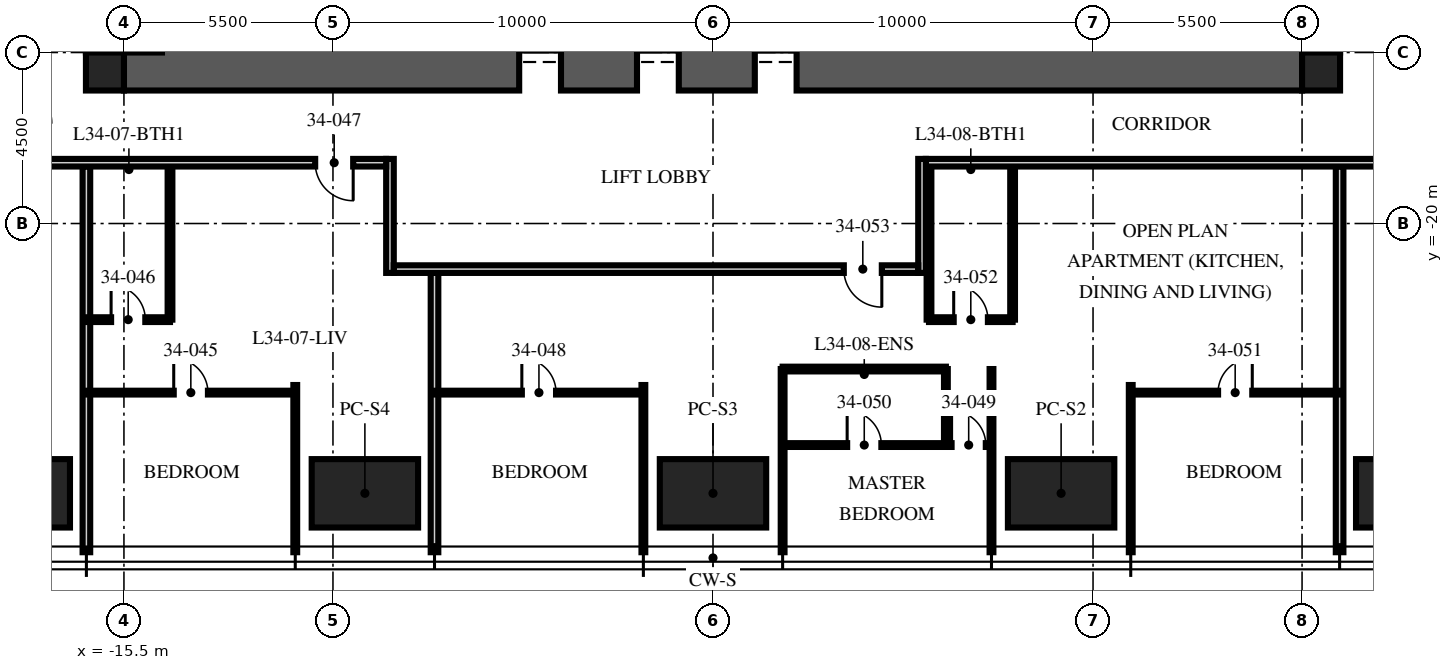
"""IFC4 building model, lengths in metres.
Left out: names, types, materials, properties, quantities, classifications, styles, units other than length and angle.
Written with IfcOpenShell. Run it as: python <this file> out.ifc"""

import sys

from ifc_helpers import new_model, si_unit, direction, frame, frame_2d, origin, origin_2d, place, context, subcontext, project, spatial, rectangle, extrude, element, fill, save


model = new_model("IFC4")
c1 = context("Model", 3, precision=1e-05, world=origin(), true_north=direction((0.0, 1.0)))
c2 = subcontext(c1, "Body", "Model", "MODEL_VIEW")
j1 = project(units=[si_unit("LENGTHUNIT", "METRE"), si_unit("PLANEANGLEUNIT", "RADIAN")], contexts=[c1])
p1 = place(None, origin())
s1 = spatial("IfcSite", under=j1, at=p1, CompositionType="ELEMENT")
p2 = place(p1, origin())
s2 = spatial("IfcBuilding", under=s1, at=p2, CompositionType="ELEMENT")
p3 = place(p2, frame((0.0, 0.0, 137.25)))
s3 = spatial("IfcBuildingStorey", under=s2, at=p3, CompositionType="ELEMENT", Elevation=137.25)
p4 = place(p3, frame((-15.5, -15.5, -0.25), z_axis=(0.0, 0.0, 1.0), x_axis=(1.0, 0.0, 0.0)))
e1 = element("IfcWall", 1, at=p4, inside=s3, PredefinedType="SHEAR", context=c2, shape_type="SweptSolid", body=[
    extrude(rectangle(XDim=31.0, YDim=2.0, at=frame_2d((15.5, 0.0))), origin(), (0.0, 0.0, 1.0), 3.75),
])
p5 = place(p4, frame((10.4, 0.0, 0.25)))
e2 = element("IfcOpeningElement", 2, at=p5, cuts=e1, PredefinedType="OPENING", context=c2, shape_type="SweptSolid", body=[
    extrude(rectangle(XDim=1.1, YDim=2.1, at=frame_2d((0.55, 1.05))), frame((0.0, 1.01, 0.0), z_axis=(0.0, -1.0, 0.0), x_axis=(1.0, 0.0, 0.0)), (0.0, 0.0, 1.0), 2.02),
])
p6 = place(p4, frame((13.5, 0.0, 0.25)))
e3 = element("IfcOpeningElement", 3, at=p6, cuts=e1, PredefinedType="OPENING", context=c2, shape_type="SweptSolid", body=[
    extrude(rectangle(XDim=1.1, YDim=2.1, at=frame_2d((0.55, 1.05))), frame((0.0, 1.01, 0.0), z_axis=(0.0, -1.0, 0.0), x_axis=(1.0, 0.0, 0.0)), (0.0, 0.0, 1.0), 2.02),
])
p7 = place(p4, frame((16.6, 0.0, 0.25)))
e4 = element("IfcOpeningElement", 4, at=p7, cuts=e1, PredefinedType="OPENING", context=c2, shape_type="SweptSolid", body=[
    extrude(rectangle(XDim=1.1, YDim=2.1, at=frame_2d((0.55, 1.05))), frame((0.0, 1.01, 0.0), z_axis=(0.0, -1.0, 0.0), x_axis=(1.0, 0.0, 0.0)), (0.0, 0.0, 1.0), 2.02),
])
for number, where, z_axis, x_axis in (
    (5, (-16.0, -16.0, -0.25), (0.0, 0.0, 1.0), (1.0, 0.0, 0.0)),
    (6, (16.0, -16.0, -0.25), (0.0, 0.0, 1.0), (1.0, 0.0, 0.0)),
):
    element("IfcColumn", number, at=place(p3, frame(where, z_axis=z_axis, x_axis=x_axis)), inside=s3, PredefinedType="COLUMN", context=c2, shape_type="SweptSolid", body=[
        extrude(rectangle(XDim=1.0, YDim=1.0, at=origin_2d()), origin(), (0.0, 0.0, 1.0), 3.75),
    ])
for number, where, z_axis, x_axis in (
    (7, (18.32, -27.1, 0.0), (0.0, 0.0, 1.0), (1.0, 0.0, 0.0)),
    (8, (9.16, -27.1, 0.0), (0.0, 0.0, 1.0), (1.0, 0.0, 0.0)),
    (9, (0.0, -27.1, 0.0), (0.0, 0.0, 1.0), (1.0, 0.0, 0.0)),
    (10, (-9.16, -27.1, 0.0), (0.0, 0.0, 1.0), (1.0, 0.0, 0.0)),
    (11, (-18.32, -27.1, 0.0), (0.0, 0.0, 1.0), (1.0, 0.0, 0.0)),
):
    element("IfcColumn", number, at=place(p3, frame(where, z_axis=z_axis, x_axis=x_axis)), inside=s3, PredefinedType="COLUMN", context=c2, shape_type="SweptSolid", body=[
        extrude(rectangle(XDim=2.8, YDim=1.8, at=origin_2d()), origin(), (0.0, 0.0, 1.0), 3.75),
    ])
p8 = place(p3, frame((-16.488, -18.5, 0.0), z_axis=(0.0, 0.0, 1.0), x_axis=(0.0, -1.0, 0.0)))
e12 = element("IfcWall", 12, at=p8, inside=s3, PredefinedType="PARTITIONING", context=c2, shape_type="SweptSolid", body=[
    extrude(rectangle(XDim=10.15, YDim=0.2, at=frame_2d((5.075, 0.0))), origin(), (0.0, 0.0, 1.0), 2.81),
])
p9 = place(p3, frame((-10.992, -24.25, 0.0), z_axis=(0.0, 0.0, 1.0), x_axis=(0.0, -1.0, 0.0)))
e13 = element("IfcWall", 13, at=p9, inside=s3, PredefinedType="PARTITIONING", context=c2, shape_type="SweptSolid", body=[
    extrude(rectangle(XDim=4.4, YDim=0.1, at=frame_2d((2.2, 0.0))), origin(), (0.0, 0.0, 1.0), 2.81),
])
p10 = place(p3, frame((-7.328, -21.3, 0.0), z_axis=(0.0, 0.0, 1.0), x_axis=(0.0, -1.0, 0.0)))
e14 = element("IfcWall", 14, at=p10, inside=s3, PredefinedType="PARTITIONING", context=c2, shape_type="SweptSolid", body=[
    extrude(rectangle(XDim=7.35, YDim=0.2, at=frame_2d((3.675, 0.0))), origin(), (0.0, 0.0, 1.0), 2.81),
])
p11 = place(p3, frame((-1.832, -24.25, 0.0), z_axis=(0.0, 0.0, 1.0), x_axis=(0.0, -1.0, 0.0)))
e15 = element("IfcWall", 15, at=p11, inside=s3, PredefinedType="PARTITIONING", context=c2, shape_type="SweptSolid", body=[
    extrude(rectangle(XDim=4.4, YDim=0.1, at=frame_2d((2.2, 0.0))), origin(), (0.0, 0.0, 1.0), 2.81),
])
for number, where, z_axis, x_axis in (
    (16, (1.832, -23.83, 0.0), (0.0, 0.0, 1.0), (0.0, -1.0, 0.0)),
    (17, (7.328, -23.83, 0.0), (0.0, 0.0, 1.0), (0.0, -1.0, 0.0)),
):
    element("IfcWall", number, at=place(p3, frame(where, z_axis=z_axis, x_axis=x_axis)), inside=s3, PredefinedType="PARTITIONING", context=c2, shape_type="SweptSolid", body=[
        extrude(rectangle(XDim=4.82, YDim=0.1, at=frame_2d((2.41, 0.0))), origin(), (0.0, 0.0, 1.0), 2.81),
    ])
p12 = place(p3, frame((10.992, -24.25, 0.0), z_axis=(0.0, 0.0, 1.0), x_axis=(0.0, -1.0, 0.0)))
e18 = element("IfcWall", 18, at=p12, inside=s3, PredefinedType="PARTITIONING", context=c2, shape_type="SweptSolid", body=[
    extrude(rectangle(XDim=4.4, YDim=0.1, at=frame_2d((2.2, 0.0))), origin(), (0.0, 0.0, 1.0), 2.81),
])
p13 = place(p3, frame((16.488, -18.5, 0.0), z_axis=(0.0, 0.0, 1.0), x_axis=(0.0, -1.0, 0.0)))
e19 = element("IfcWall", 19, at=p13, inside=s3, PredefinedType="PARTITIONING", context=c2, shape_type="SweptSolid", body=[
    extrude(rectangle(XDim=10.15, YDim=0.2, at=frame_2d((5.075, 0.0))), origin(), (0.0, 0.0, 1.0), 2.81),
])
p14 = place(p3, frame((-16.488, -24.45, 0.0), z_axis=(0.0, 0.0, 1.0), x_axis=(1.0, 0.0, 0.0)))
e20 = element("IfcWall", 20, at=p14, inside=s3, PredefinedType="PARTITIONING", context=c2, shape_type="SweptSolid", body=[
    extrude(rectangle(XDim=5.496, YDim=0.1, at=frame_2d((2.748, 0.0))), origin(), (0.0, 0.0, 1.0), 2.81),
])
p15 = place(p14, frame((2.298, 0.0, 0.0)))
e21 = element("IfcOpeningElement", 21, at=p15, cuts=e20, PredefinedType="OPENING", context=c2, shape_type="SweptSolid", body=[
    extrude(rectangle(XDim=0.9, YDim=2.1, at=frame_2d((0.45, 1.05))), frame((0.0, 0.06, 0.0), z_axis=(0.0, -1.0, 0.0), x_axis=(1.0, 0.0, 0.0)), (0.0, 0.0, 1.0), 0.12),
])
p16 = place(p3, frame((-16.488, -22.53, 0.0), z_axis=(0.0, 0.0, 1.0), x_axis=(1.0, 0.0, 0.0)))
e22 = element("IfcWall", 22, at=p16, inside=s3, PredefinedType="PARTITIONING", context=c2, shape_type="SweptSolid", body=[
    extrude(rectangle(XDim=2.2, YDim=0.125, at=frame_2d((1.1, 0.0))), origin(), (0.0, 0.0, 1.0), 3.5),
])
p17 = place(p16, frame((0.65, 0.0, 0.0)))
e23 = element("IfcOpeningElement", 23, at=p17, cuts=e22, PredefinedType="OPENING", context=c2, shape_type="SweptSolid", body=[
    extrude(rectangle(XDim=0.9, YDim=2.1, at=frame_2d((0.45, 1.05))), frame((0.0, 0.073, 0.0), z_axis=(0.0, -1.0, 0.0), x_axis=(1.0, 0.0, 0.0)), (0.0, 0.0, 1.0), 0.145),
])
p18 = place(p3, frame((-14.288, -18.5, 0.0), z_axis=(0.0, 0.0, 1.0), x_axis=(0.0, -1.0, 0.0)))
e24 = element("IfcWall", 24, at=p18, inside=s3, PredefinedType="PARTITIONING", context=c2, shape_type="SweptSolid", body=[
    extrude(rectangle(XDim=4.03, YDim=0.125, at=frame_2d((2.015, 0.0))), origin(), (0.0, 0.0, 1.0), 3.5),
])
p19 = place(p3, frame((-7.328, -24.45, 0.0), z_axis=(0.0, 0.0, 1.0), x_axis=(1.0, 0.0, 0.0)))
e25 = element("IfcWall", 25, at=p19, inside=s3, PredefinedType="PARTITIONING", context=c2, shape_type="SweptSolid", body=[
    extrude(rectangle(XDim=5.496, YDim=0.1, at=frame_2d((2.748, 0.0))), origin(), (0.0, 0.0, 1.0), 2.81),
])
p20 = place(p19, frame((2.298, 0.0, 0.0)))
e26 = element("IfcOpeningElement", 26, at=p20, cuts=e25, PredefinedType="OPENING", context=c2, shape_type="SweptSolid", body=[
    extrude(rectangle(XDim=0.9, YDim=2.1, at=frame_2d((0.45, 1.05))), frame((0.0, 0.06, 0.0), z_axis=(0.0, -1.0, 0.0), x_axis=(1.0, 0.0, 0.0)), (0.0, 0.0, 1.0), 0.12),
])
p21 = place(p3, frame((1.832, -25.83, 0.0), z_axis=(0.0, 0.0, 1.0), x_axis=(1.0, 0.0, 0.0)))
e27 = element("IfcWall", 27, at=p21, inside=s3, PredefinedType="PARTITIONING", context=c2, shape_type="SweptSolid", body=[
    extrude(rectangle(XDim=5.496, YDim=0.1, at=frame_2d((2.748, 0.0))), origin(), (0.0, 0.0, 1.0), 2.81),
])
p22 = place(p21, frame((4.446, 0.0, 0.0)))
e28 = element("IfcOpeningElement", 28, at=p22, cuts=e27, PredefinedType="OPENING", context=c2, shape_type="SweptSolid", body=[
    extrude(rectangle(XDim=0.9, YDim=2.1, at=frame_2d((0.45, 1.05))), frame((0.0, 0.06, 0.0), z_axis=(0.0, -1.0, 0.0), x_axis=(1.0, 0.0, 0.0)), (0.0, 0.0, 1.0), 0.12),
])
p23 = place(p21, frame((1.698, 0.0, 0.0)))
e29 = element("IfcOpeningElement", 29, at=p23, cuts=e27, PredefinedType="OPENING", context=c2, shape_type="SweptSolid", body=[
    extrude(rectangle(XDim=0.9, YDim=2.1, at=frame_2d((0.45, 1.05))), frame((0.0, 0.06, 0.0), z_axis=(0.0, -1.0, 0.0), x_axis=(1.0, 0.0, 0.0)), (0.0, 0.0, 1.0), 0.12),
])
p24 = place(p3, frame((6.128, -23.83, 0.0), z_axis=(0.0, 0.0, 1.0), x_axis=(0.0, -1.0, 0.0)))
e30 = element("IfcWall", 30, at=p24, inside=s3, PredefinedType="PARTITIONING", context=c2, shape_type="SweptSolid", body=[
    extrude(rectangle(XDim=2.0, YDim=0.1, at=frame_2d((1.0, 0.0))), origin(), (0.0, 0.0, 1.0), 3.5),
])
p25 = place(p3, frame((1.832, -23.83, 0.0), z_axis=(0.0, 0.0, 1.0), x_axis=(1.0, 0.0, 0.0)))
e31 = element("IfcWall", 31, at=p25, inside=s3, PredefinedType="PARTITIONING", context=c2, shape_type="SweptSolid", body=[
    extrude(rectangle(XDim=4.296, YDim=0.125, at=frame_2d((2.148, 0.0))), origin(), (0.0, 0.0, 1.0), 2.81),
])
p26 = place(p3, frame((10.992, -24.45, 0.0), z_axis=(0.0, 0.0, 1.0), x_axis=(1.0, 0.0, 0.0)))
e32 = element("IfcWall", 32, at=p26, inside=s3, PredefinedType="PARTITIONING", context=c2, shape_type="SweptSolid", body=[
    extrude(rectangle(XDim=5.496, YDim=0.1, at=frame_2d((2.748, 0.0))), origin(), (0.0, 0.0, 1.0), 2.81),
])
p27 = place(p26, frame((2.298, 0.0, 0.0)))
e33 = element("IfcOpeningElement", 33, at=p27, cuts=e32, PredefinedType="OPENING", context=c2, shape_type="SweptSolid", body=[
    extrude(rectangle(XDim=0.9, YDim=2.1, at=frame_2d((0.45, 1.05))), frame((0.0, 0.06, 0.0), z_axis=(0.0, -1.0, 0.0), x_axis=(1.0, 0.0, 0.0)), (0.0, 0.0, 1.0), 0.12),
])
p28 = place(p3, frame((5.684, -22.53, 0.0), z_axis=(0.0, 0.0, 1.0), x_axis=(1.0, 0.0, 0.0)))
e34 = element("IfcWall", 34, at=p28, inside=s3, PredefinedType="PARTITIONING", context=c2, shape_type="SweptSolid", body=[
    extrude(rectangle(XDim=2.2, YDim=0.125, at=frame_2d((1.1, 0.0))), origin(), (0.0, 0.0, 1.0), 3.5),
])
p29 = place(p28, frame((0.65, 0.0, 0.0)))
e35 = element("IfcOpeningElement", 35, at=p29, cuts=e34, PredefinedType="OPENING", context=c2, shape_type="SweptSolid", body=[
    extrude(rectangle(XDim=0.9, YDim=2.1, at=frame_2d((0.45, 1.05))), frame((0.0, 0.073, 0.0), z_axis=(0.0, -1.0, 0.0), x_axis=(1.0, 0.0, 0.0)), (0.0, 0.0, 1.0), 0.145),
])
for number, where, z_axis, x_axis in (
    (36, (5.684, -18.5, 0.0), (0.0, 0.0, 1.0), (0.0, -1.0, 0.0)),
    (37, (7.884, -18.5, 0.0), (0.0, 0.0, 1.0), (0.0, -1.0, 0.0)),
):
    element("IfcWall", number, at=place(p3, frame(where, z_axis=z_axis, x_axis=x_axis)), inside=s3, PredefinedType="PARTITIONING", context=c2, shape_type="SweptSolid", body=[
        extrude(rectangle(XDim=4.03, YDim=0.125, at=frame_2d((2.015, 0.0))), origin(), (0.0, 0.0, 1.0), 3.5),
    ])
p30 = place(p3, frame((18.5, -18.4, 0.0), z_axis=(0.0, 0.0, 1.0), x_axis=(-1.0, 0.0, 0.0)))
e38 = element("IfcWall", 38, at=p30, inside=s3, PredefinedType="PARTITIONING", context=c2, shape_type="SweptSolid", body=[
    extrude(rectangle(XDim=12.9, YDim=0.2, at=frame_2d((6.45, 0.0))), origin(), (0.0, 0.0, 1.0), 2.3),
])
for number, where, z_axis, x_axis in (
    (39, (5.5, -18.3, 0.0), (0.0, 0.0, 1.0), (0.0, -1.0, 0.0)),
    (40, (-8.5, -18.3, 0.0), (0.0, 0.0, 1.0), (0.0, -1.0, 0.0)),
):
    element("IfcWall", number, at=place(p3, frame(where, z_axis=z_axis, x_axis=x_axis)), inside=s3, PredefinedType="PARTITIONING", context=c2, shape_type="SweptSolid", body=[
        extrude(rectangle(XDim=3.0, YDim=0.2, at=frame_2d((1.5, 0.0))), origin(), (0.0, 0.0, 1.0), 3.5),
    ])
p31 = place(p3, frame((5.4, -21.2, 0.0), z_axis=(0.0, 0.0, 1.0), x_axis=(-1.0, 0.0, 0.0)))
e41 = element("IfcWall", 41, at=p31, inside=s3, PredefinedType="PARTITIONING", context=c2, shape_type="SweptSolid", body=[
    extrude(rectangle(XDim=13.8, YDim=0.2, at=frame_2d((6.9, 0.0))), origin(), (0.0, 0.0, 1.0), 2.7),
])
p32 = place(p31, frame((0.958, 0.0, 0.0)))
e42 = element("IfcOpeningElement", 42, at=p32, cuts=e41, PredefinedType="OPENING", context=c2, shape_type="SweptSolid", body=[
    extrude(rectangle(XDim=1.0, YDim=2.2, at=frame_2d((0.5, 1.1))), frame((0.0, 0.11, 0.0), z_axis=(0.0, -1.0, 0.0), x_axis=(1.0, 0.0, 0.0)), (0.0, 0.0, 1.0), 0.22),
])
p33 = place(p3, frame((-8.6, -18.4, 0.0), z_axis=(0.0, 0.0, 1.0), x_axis=(-1.0, 0.0, 0.0)))
e43 = element("IfcWall", 43, at=p33, inside=s3, PredefinedType="PARTITIONING", context=c2, shape_type="SweptSolid", body=[
    extrude(rectangle(XDim=9.9, YDim=0.2, at=frame_2d((4.95, 0.0))), origin(), (0.0, 0.0, 1.0), 2.3),
])
p34 = place(p33, frame((0.868, 0.0, 0.0)))
e44 = element("IfcOpeningElement", 44, at=p34, cuts=e43, PredefinedType="OPENING", context=c2, shape_type="SweptSolid", body=[
    extrude(rectangle(XDim=1.0, YDim=2.2, at=frame_2d((0.5, 1.1))), frame((0.0, 0.11, 0.0), z_axis=(0.0, -1.0, 0.0), x_axis=(1.0, 0.0, 0.0)), (0.0, 0.0, 1.0), 0.22),
])
p35 = place(p5, origin())
e45 = element("IfcDoor", 45, at=p35, inside=s3, OperationType="DOUBLE_DOOR_SLIDING", PredefinedType="DOOR", context=c2, shape_type="SweptSolid", body=[
    extrude(rectangle(XDim=1.1, YDim=2.1, at=frame_2d((0.55, 1.05))), frame((0.0, 0.025, 0.0), z_axis=(0.0, -1.0, 0.0), x_axis=(1.0, 0.0, 0.0)), (0.0, 0.0, 1.0), 0.05),
])
fill(e2, e45)
p36 = place(p6, origin())
e46 = element("IfcDoor", 46, at=p36, inside=s3, OperationType="DOUBLE_DOOR_SLIDING", PredefinedType="DOOR", context=c2, shape_type="SweptSolid", body=[
    extrude(rectangle(XDim=1.1, YDim=2.1, at=frame_2d((0.55, 1.05))), frame((0.0, 0.025, 0.0), z_axis=(0.0, -1.0, 0.0), x_axis=(1.0, 0.0, 0.0)), (0.0, 0.0, 1.0), 0.05),
])
fill(e3, e46)
p37 = place(p7, origin())
e47 = element("IfcDoor", 47, at=p37, inside=s3, OperationType="DOUBLE_DOOR_SLIDING", PredefinedType="DOOR", context=c2, shape_type="SweptSolid", body=[
    extrude(rectangle(XDim=1.1, YDim=2.1, at=frame_2d((0.55, 1.05))), frame((0.0, 0.025, 0.0), z_axis=(0.0, -1.0, 0.0), x_axis=(1.0, 0.0, 0.0)), (0.0, 0.0, 1.0), 0.05),
])
fill(e4, e47)
p38 = place(p15, origin())
e48 = element("IfcDoor", 48, at=p38, inside=s3, OperationType="SINGLE_SWING_LEFT", PredefinedType="DOOR", context=c2, shape_type="SweptSolid", body=[
    extrude(rectangle(XDim=0.9, YDim=2.1, at=frame_2d((0.45, 1.05))), frame((0.0, 0.025, 0.0), z_axis=(0.0, -1.0, 0.0), x_axis=(1.0, 0.0, 0.0)), (0.0, 0.0, 1.0), 0.05),
])
fill(e21, e48)
p39 = place(p17, origin())
e49 = element("IfcDoor", 49, at=p39, inside=s3, OperationType="SINGLE_SWING_LEFT", PredefinedType="DOOR", context=c2, shape_type="SweptSolid", body=[
    extrude(rectangle(XDim=0.9, YDim=2.1, at=frame_2d((0.45, 1.05))), frame((0.0, 0.025, 0.0), z_axis=(0.0, -1.0, 0.0), x_axis=(1.0, 0.0, 0.0)), (0.0, 0.0, 1.0), 0.05),
])
fill(e23, e49)
p40 = place(p34, origin())
e50 = element("IfcDoor", 50, at=p40, inside=s3, OperationType="SINGLE_SWING_LEFT", PredefinedType="DOOR", context=c2, shape_type="SweptSolid", body=[
    extrude(rectangle(XDim=1.0, YDim=2.2, at=frame_2d((0.5, 1.1))), frame((0.0, 0.025, 0.0), z_axis=(0.0, -1.0, 0.0), x_axis=(1.0, 0.0, 0.0)), (0.0, 0.0, 1.0), 0.05),
])
fill(e44, e50)
p41 = place(p20, origin())
e51 = element("IfcDoor", 51, at=p41, inside=s3, OperationType="SINGLE_SWING_LEFT", PredefinedType="DOOR", context=c2, shape_type="SweptSolid", body=[
    extrude(rectangle(XDim=0.9, YDim=2.1, at=frame_2d((0.45, 1.05))), frame((0.0, 0.025, 0.0), z_axis=(0.0, -1.0, 0.0), x_axis=(1.0, 0.0, 0.0)), (0.0, 0.0, 1.0), 0.05),
])
fill(e26, e51)
p42 = place(p22, origin())
e52 = element("IfcDoor", 52, at=p42, inside=s3, OperationType="SINGLE_SWING_LEFT", PredefinedType="DOOR", context=c2, shape_type="SweptSolid", body=[
    extrude(rectangle(XDim=0.9, YDim=2.1, at=frame_2d((0.45, 1.05))), frame((0.0, 0.025, 0.0), z_axis=(0.0, -1.0, 0.0), x_axis=(1.0, 0.0, 0.0)), (0.0, 0.0, 1.0), 0.05),
])
fill(e28, e52)
p43 = place(p23, origin())
e53 = element("IfcDoor", 53, at=p43, inside=s3, OperationType="SINGLE_SWING_LEFT", PredefinedType="DOOR", context=c2, shape_type="SweptSolid", body=[
    extrude(rectangle(XDim=0.9, YDim=2.1, at=frame_2d((0.45, 1.05))), frame((0.0, 0.025, 0.0), z_axis=(0.0, -1.0, 0.0), x_axis=(1.0, 0.0, 0.0)), (0.0, 0.0, 1.0), 0.05),
])
fill(e29, e53)
p44 = place(p27, origin())
e54 = element("IfcDoor", 54, at=p44, inside=s3, OperationType="SINGLE_SWING_RIGHT", PredefinedType="DOOR", context=c2, shape_type="SweptSolid", body=[
    extrude(rectangle(XDim=0.9, YDim=2.1, at=frame_2d((0.45, 1.05))), frame((0.0, 0.025, 0.0), z_axis=(0.0, -1.0, 0.0), x_axis=(1.0, 0.0, 0.0)), (0.0, 0.0, 1.0), 0.05),
])
fill(e33, e54)
p45 = place(p29, origin())
e55 = element("IfcDoor", 55, at=p45, inside=s3, OperationType="SINGLE_SWING_LEFT", PredefinedType="DOOR", context=c2, shape_type="SweptSolid", body=[
    extrude(rectangle(XDim=0.9, YDim=2.1, at=frame_2d((0.45, 1.05))), frame((0.0, 0.025, 0.0), z_axis=(0.0, -1.0, 0.0), x_axis=(1.0, 0.0, 0.0)), (0.0, 0.0, 1.0), 0.05),
])
fill(e35, e55)
p46 = place(p32, origin())
e56 = element("IfcDoor", 56, at=p46, inside=s3, OperationType="SINGLE_SWING_LEFT", PredefinedType="DOOR", context=c2, shape_type="SweptSolid", body=[
    extrude(rectangle(XDim=1.0, YDim=2.2, at=frame_2d((0.5, 1.1))), frame((0.0, 0.025, 0.0), z_axis=(0.0, -1.0, 0.0), x_axis=(1.0, 0.0, 0.0)), (0.0, 0.0, 1.0), 0.05),
])
fill(e42, e56)
save(model, sys.argv[1])
